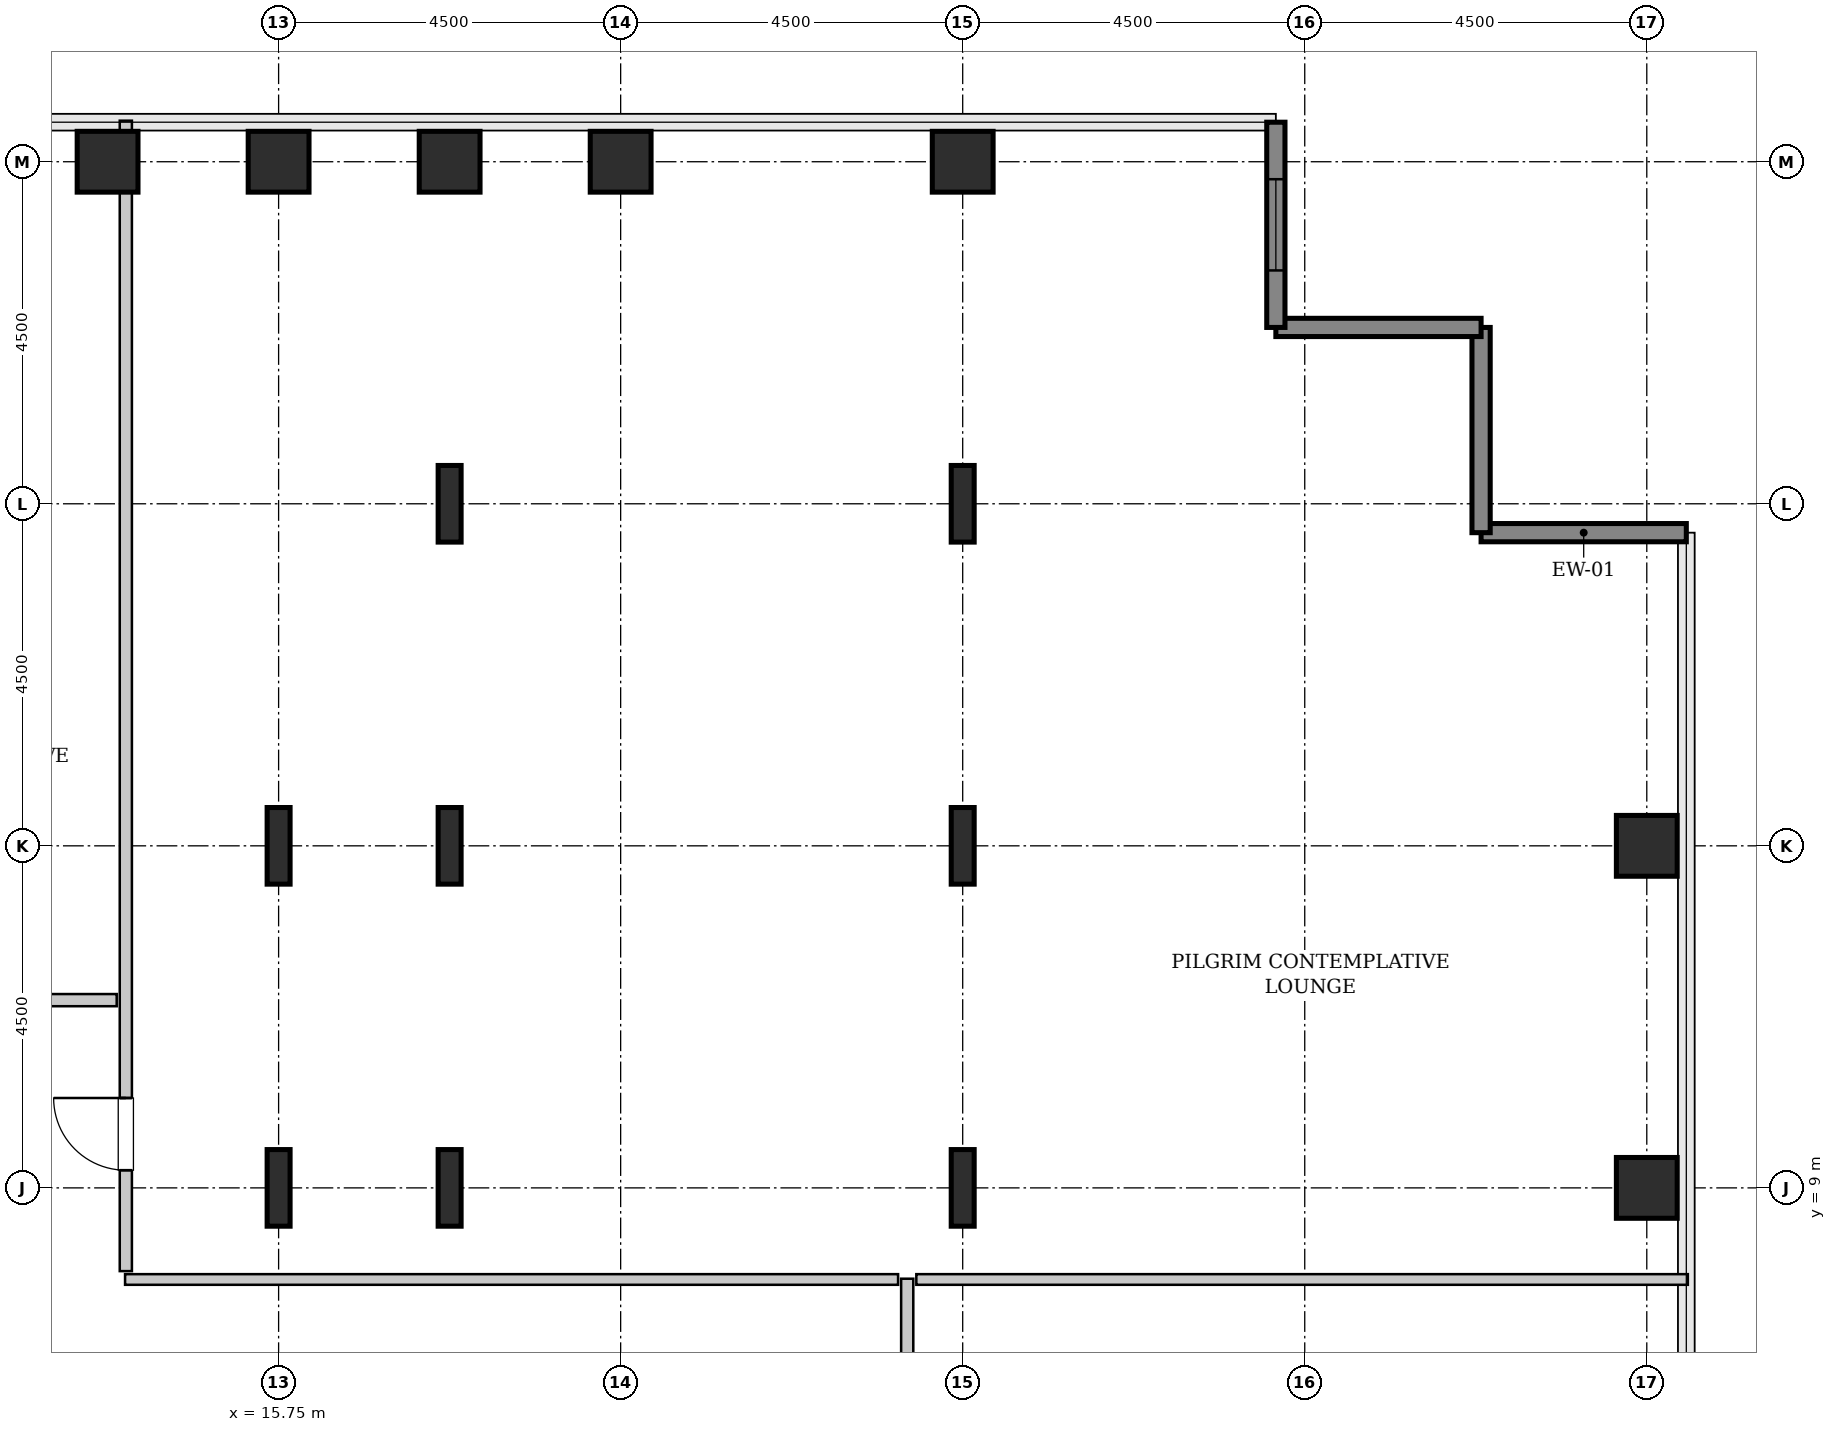
"""IFC4 building model, lengths in metres.
Left out: names, types, materials, properties, quantities, classifications, styles, units other than length and angle.
Written with IfcOpenShell. Run it as: python <this file> out.ifc"""

import sys

from ifc_helpers import new_model, si_unit, direction, frame, frame_2d, origin, origin_2d, place, context, subcontext, project, spatial, rectangle, hollow_rectangle, i_section, extrude, source, transform, mapped, element, fill, save


model = new_model("IFC4")
c1 = context("Model", 3, precision=1e-05, world=origin(), true_north=direction((0.0, 1.0)))
c2 = subcontext(c1, "Body", "Model", "MODEL_VIEW")
j1 = project(units=[si_unit("LENGTHUNIT", "METRE"), si_unit("PLANEANGLEUNIT", "RADIAN")], contexts=[c1])
p1 = place(None, origin())
s1 = spatial("IfcSite", under=j1, at=p1, CompositionType="ELEMENT")
p2 = place(p1, origin())
s2 = spatial("IfcBuilding", under=s1, at=p2, CompositionType="ELEMENT")
p3 = place(p2, frame((0.0, 0.0, 117.4)))
s3 = spatial("IfcBuildingStorey", under=s2, at=p3, CompositionType="ELEMENT", Elevation=117.4)
m1 = source(origin(), c2, "Body", "SweptSolid", [
    extrude(hollow_rectangle(XDim=0.8, YDim=0.8, WallThickness=0.04, InnerFilletRadius=0.04, OuterFilletRadius=0.08, at=origin_2d()), origin(), (0.0, 0.0, 1.0), 3.8),
])
p4 = place(p3, frame((13.5, 22.5, 0.0), z_axis=(0.0, 0.0, 1.0), x_axis=(1.0, 0.0, 0.0)))
e1 = element("IfcColumn", 1, at=p4, inside=s3, PredefinedType="COLUMN", context=c2, shape_type="MappedRepresentation", body=[
    mapped(m1, transform((0.0, 0.0, 0.0), x_axis=(1.0, 0.0, 0.0), y_axis=(0.0, 1.0, 0.0), z_axis=(0.0, 0.0, 1.0), scale=1.0)),
])
m2 = source(origin(), c2, "Body", "SweptSolid", [
    extrude(i_section(OverallWidth=0.302, OverallDepth=1.008, WebThickness=0.021, FlangeThickness=0.04, FilletRadius=0.03, at=origin_2d()), origin(), (0.0, 0.0, 1.0), 3.8),
])
for number, where, z_axis, x_axis in (
    (2, (15.75, 9.0, 0.0), (0.0, 0.0, 1.0), (1.0, 0.0, 0.0)),
    (3, (15.75, 13.5, 0.0), (0.0, 0.0, 1.0), (1.0, 0.0, 0.0)),
):
    element("IfcColumn", number, at=place(p3, frame(where, z_axis=z_axis, x_axis=x_axis)), inside=s3, PredefinedType="COLUMN", context=c2, shape_type="MappedRepresentation", body=[
        mapped(m2, transform((0.0, 0.0, 0.0), x_axis=(1.0, 0.0, 0.0), y_axis=(0.0, 1.0, 0.0), z_axis=(0.0, 0.0, 1.0), scale=1.0)),
    ])
p5 = place(p3, frame((15.75, 22.5, 0.0), z_axis=(0.0, 0.0, 1.0), x_axis=(1.0, 0.0, 0.0)))
e4 = element("IfcColumn", 4, at=p5, inside=s3, PredefinedType="COLUMN", context=c2, shape_type="MappedRepresentation", body=[
    mapped(m1, transform((0.0, 0.0, 0.0), x_axis=(1.0, 0.0, 0.0), y_axis=(0.0, 1.0, 0.0), z_axis=(0.0, 0.0, 1.0), scale=1.0)),
])
for number, where, z_axis, x_axis in (
    (5, (18.0, 9.0, 0.0), (0.0, 0.0, 1.0), (1.0, 0.0, 0.0)),
    (6, (18.0, 13.5, 0.0), (0.0, 0.0, 1.0), (1.0, 0.0, 0.0)),
    (7, (18.0, 18.0, 0.0), (0.0, 0.0, 1.0), (1.0, 0.0, 0.0)),
):
    element("IfcColumn", number, at=place(p3, frame(where, z_axis=z_axis, x_axis=x_axis)), inside=s3, PredefinedType="COLUMN", context=c2, shape_type="MappedRepresentation", body=[
        mapped(m2, transform((0.0, 0.0, 0.0), x_axis=(1.0, 0.0, 0.0), y_axis=(0.0, 1.0, 0.0), z_axis=(0.0, 0.0, 1.0), scale=1.0)),
    ])
for number, where, z_axis, x_axis in (
    (8, (18.0, 22.5, 0.0), (0.0, 0.0, 1.0), (1.0, 0.0, 0.0)),
    (9, (20.25, 22.5, 0.0), (0.0, 0.0, 1.0), (1.0, 0.0, 0.0)),
):
    element("IfcColumn", number, at=place(p3, frame(where, z_axis=z_axis, x_axis=x_axis)), inside=s3, PredefinedType="COLUMN", context=c2, shape_type="MappedRepresentation", body=[
        mapped(m1, transform((0.0, 0.0, 0.0), x_axis=(1.0, 0.0, 0.0), y_axis=(0.0, 1.0, 0.0), z_axis=(0.0, 0.0, 1.0), scale=1.0)),
    ])
for number, where, z_axis, x_axis in (
    (10, (24.75, 9.0, 0.0), (0.0, 0.0, 1.0), (1.0, 0.0, 0.0)),
    (11, (24.75, 13.5, 0.0), (0.0, 0.0, 1.0), (1.0, 0.0, 0.0)),
    (12, (24.75, 18.0, 0.0), (0.0, 0.0, 1.0), (1.0, 0.0, 0.0)),
):
    element("IfcColumn", number, at=place(p3, frame(where, z_axis=z_axis, x_axis=x_axis)), inside=s3, PredefinedType="COLUMN", context=c2, shape_type="MappedRepresentation", body=[
        mapped(m2, transform((0.0, 0.0, 0.0), x_axis=(1.0, 0.0, 0.0), y_axis=(0.0, 1.0, 0.0), z_axis=(0.0, 0.0, 1.0), scale=1.0)),
    ])
for number, where, z_axis, x_axis in (
    (13, (24.75, 22.5, 0.0), (0.0, 0.0, 1.0), (1.0, 0.0, 0.0)),
    (14, (33.75, 9.0, 0.0), (0.0, 0.0, 1.0), (1.0, 0.0, 0.0)),
    (15, (33.75, 13.5, 0.0), (0.0, 0.0, 1.0), (1.0, 0.0, 0.0)),
):
    element("IfcColumn", number, at=place(p3, frame(where, z_axis=z_axis, x_axis=x_axis)), inside=s3, PredefinedType="COLUMN", context=c2, shape_type="MappedRepresentation", body=[
        mapped(m1, transform((0.0, 0.0, 0.0), x_axis=(1.0, 0.0, 0.0), y_axis=(0.0, 1.0, 0.0), z_axis=(0.0, 0.0, 1.0), scale=1.0)),
    ])
m3 = source(origin(), c2, "Body", "SweptSolid", [
    extrude(rectangle(XDim=2.7, YDim=0.24, at=frame_2d((1.35, 0.0))), origin(), (0.0, 0.0, 1.0), 3.55),
])
for number, where, z_axis, x_axis in (
    (16, (34.27, 17.62, 0.0), (0.0, 0.0, 1.0), (-1.0, 0.0, 0.0)),
    (17, (31.57, 17.62, 0.0), (0.0, 0.0, 1.0), (0.0, 1.0, 0.0)),
    (18, (31.57, 20.32, 0.0), (0.0, 0.0, 1.0), (-1.0, 0.0, 0.0)),
):
    element("IfcWall", number, at=place(p3, frame(where, z_axis=z_axis, x_axis=x_axis)), inside=s3, PredefinedType="SHEAR", context=c2, shape_type="MappedRepresentation", body=[
        mapped(m3, transform((0.0, 0.0, 0.0), x_axis=(1.0, 0.0, 0.0), y_axis=(0.0, 1.0, 0.0), z_axis=(0.0, 0.0, 1.0), scale=1.0)),
    ])
p6 = place(p3, frame((28.87, 20.32, 0.0), z_axis=(0.0, 0.0, 1.0), x_axis=(0.0, 1.0, 0.0)))
e19 = element("IfcWall", 19, at=p6, inside=s3, PredefinedType="SHEAR", context=c2, shape_type="MappedRepresentation", body=[
    mapped(m3, transform((0.0, 0.0, 0.0), x_axis=(1.0, 0.0, 0.0), y_axis=(0.0, 1.0, 0.0), z_axis=(0.0, 0.0, 1.0), scale=1.0)),
])
p7 = place(p6, frame((0.75, 0.0, 0.85)))
e20 = element("IfcOpeningElement", 20, at=p7, cuts=e19, PredefinedType="OPENING", context=c2, shape_type="SweptSolid", body=[
    extrude(rectangle(XDim=1.2, YDim=1.8, at=frame_2d((0.6, 0.9))), frame((0.0, 0.13, 0.0), z_axis=(0.0, -1.0, 0.0), x_axis=(1.0, 0.0, 0.0)), (0.0, 0.0, 1.0), 0.26),
])
m4 = source(origin(), c2, "Body", "SweptSolid", [
    extrude(rectangle(XDim=15.5, YDim=0.16, at=frame_2d((7.75, 0.0))), origin(), (0.0, 0.0, 1.0), 3.535),
])
p8 = place(p3, frame((24.02, -7.695, 0.0), z_axis=(0.0, 0.0, 1.0), x_axis=(0.0, 1.0, 0.0)))
e21 = element("IfcWall", 21, at=p8, inside=s3, PredefinedType="PARTITIONING", context=c2, shape_type="MappedRepresentation", body=[
    mapped(m4, transform((0.0, 0.0, 0.0), x_axis=(1.0, 0.0, 0.0), y_axis=(0.0, 1.0, 0.0), z_axis=(0.0, 0.0, 1.0), scale=1.0)),
])
p9 = place(p8, frame((9.47, 0.0, 0.0)))
e22 = element("IfcOpeningElement", 22, at=p9, cuts=e21, PredefinedType="OPENING", context=c2, shape_type="SweptSolid", body=[
    extrude(rectangle(XDim=0.95, YDim=2.1, at=frame_2d((0.475, 1.05))), frame((0.0, 0.09, 0.0), z_axis=(0.0, -1.0, 0.0), x_axis=(1.0, 0.0, 0.0)), (0.0, 0.0, 1.0), 0.18),
])
m5 = source(origin(), c2, "Body", "SweptSolid", [
    extrude(rectangle(XDim=10.17, YDim=0.14, at=frame_2d((5.085, 0.0))), origin(), (0.0, 0.0, 1.0), 3.535),
])
p10 = place(p3, frame((13.73, 7.795, 0.0), z_axis=(0.0, 0.0, 1.0), x_axis=(1.0, 0.0, 0.0)))
e23 = element("IfcWall", 23, at=p10, inside=s3, PredefinedType="PARTITIONING", context=c2, shape_type="MappedRepresentation", body=[
    mapped(m5, transform((0.0, 0.0, 0.0), x_axis=(1.0, 0.0, 0.0), y_axis=(0.0, 1.0, 0.0), z_axis=(0.0, 0.0, 1.0), scale=1.0)),
])
m6 = source(origin(), c2, "Body", "SweptSolid", [
    extrude(rectangle(XDim=10.15, YDim=0.14, at=frame_2d((5.075, 0.0))), origin(), (0.0, 0.0, 1.0), 3.535),
])
p11 = place(p3, frame((24.14, 7.795, 0.0), z_axis=(0.0, 0.0, 1.0), x_axis=(1.0, 0.0, 0.0)))
e24 = element("IfcWall", 24, at=p11, inside=s3, PredefinedType="PARTITIONING", context=c2, shape_type="MappedRepresentation", body=[
    mapped(m6, transform((0.0, 0.0, 0.0), x_axis=(1.0, 0.0, 0.0), y_axis=(0.0, 1.0, 0.0), z_axis=(0.0, 0.0, 1.0), scale=1.0)),
])
m7 = source(origin(), c2, "Body", "SweptSolid", [
    extrude(rectangle(XDim=15.135, YDim=0.16, at=frame_2d((7.567, 0.0))), origin(), (0.0, 0.0, 1.0), 3.535),
])
p12 = place(p3, frame((13.74, 7.905, 0.0), z_axis=(0.0, 0.0, 1.0), x_axis=(0.0, 1.0, 0.0)))
e25 = element("IfcWall", 25, at=p12, inside=s3, PredefinedType="PARTITIONING", context=c2, shape_type="MappedRepresentation", body=[
    mapped(m7, transform((0.0, 0.0, 0.0), x_axis=(1.0, 0.0, 0.0), y_axis=(0.0, 1.0, 0.0), z_axis=(0.0, 0.0, 1.0), scale=1.0)),
])
p13 = place(p12, frame((1.327, 0.0, 0.0)))
e26 = element("IfcOpeningElement", 26, at=p13, cuts=e25, PredefinedType="OPENING", context=c2, shape_type="SweptSolid", body=[
    extrude(rectangle(XDim=0.95, YDim=2.1, at=frame_2d((0.475, 1.05))), frame((0.0, 0.09, 0.0), z_axis=(0.0, -1.0, 0.0), x_axis=(1.0, 0.0, 0.0)), (0.0, 0.0, 1.0), 0.18),
])
m8 = source(origin(), c2, "Body", "SweptSolid", [
    extrude(rectangle(XDim=3.66, YDim=0.16, at=frame_2d((1.83, 0.0))), origin(), (0.0, 0.0, 1.0), 3.535),
])
p14 = place(p3, frame((9.96, 11.47, 0.0), z_axis=(0.0, 0.0, 1.0), x_axis=(1.0, 0.0, 0.0)))
e27 = element("IfcWall", 27, at=p14, inside=s3, PredefinedType="PARTITIONING", context=c2, shape_type="MappedRepresentation", body=[
    mapped(m8, transform((0.0, 0.0, 0.0), x_axis=(1.0, 0.0, 0.0), y_axis=(0.0, 1.0, 0.0), z_axis=(0.0, 0.0, 1.0), scale=1.0)),
])
p15 = place(p14, frame((1.355, 0.0, 0.0)))
e28 = element("IfcOpeningElement", 28, at=p15, cuts=e27, PredefinedType="OPENING", context=c2, shape_type="SweptSolid", body=[
    extrude(rectangle(XDim=0.95, YDim=2.1, at=frame_2d((0.475, 1.05))), frame((0.0, 0.09, 0.0), z_axis=(0.0, -1.0, 0.0), x_axis=(1.0, 0.0, 0.0)), (0.0, 0.0, 1.0), 0.18),
])
m9 = source(origin(), c2, "Body", "SweptSolid", [
    extrude(rectangle(XDim=1.2, YDim=1.8, at=frame_2d((0.6, 0.9))), frame((0.0, 0.03, 0.0), z_axis=(0.0, -1.0, 0.0), x_axis=(1.0, 0.0, 0.0)), (0.0, 0.0, 1.0), 0.06),
])
p16 = place(p7, origin())
e29 = element("IfcWindow", 29, at=p16, inside=s3, PartitioningType="SINGLE_PANEL", PredefinedType="WINDOW", context=c2, shape_type="MappedRepresentation", body=[
    mapped(m9, transform((0.0, 0.0, 0.0), x_axis=(1.0, 0.0, 0.0), y_axis=(0.0, 1.0, 0.0), z_axis=(0.0, 0.0, 1.0), scale=1.0)),
])
fill(e20, e29)
m10 = source(origin(), c2, "Body", "SweptSolid", [
    extrude(rectangle(XDim=0.95, YDim=2.1, at=frame_2d((0.475, 1.05))), frame((0.0, 0.025, 0.0), z_axis=(0.0, -1.0, 0.0), x_axis=(1.0, 0.0, 0.0)), (0.0, 0.0, 1.0), 0.05),
])
p17 = place(p13, origin())
e30 = element("IfcDoor", 30, at=p17, inside=s3, OperationType="SINGLE_SWING_RIGHT", PredefinedType="DOOR", context=c2, shape_type="MappedRepresentation", body=[
    mapped(m10, transform((0.0, 0.0, 0.0), x_axis=(1.0, 0.0, 0.0), y_axis=(0.0, 1.0, 0.0), z_axis=(0.0, 0.0, 1.0), scale=1.0)),
])
fill(e26, e30)
save(model, sys.argv[1])
